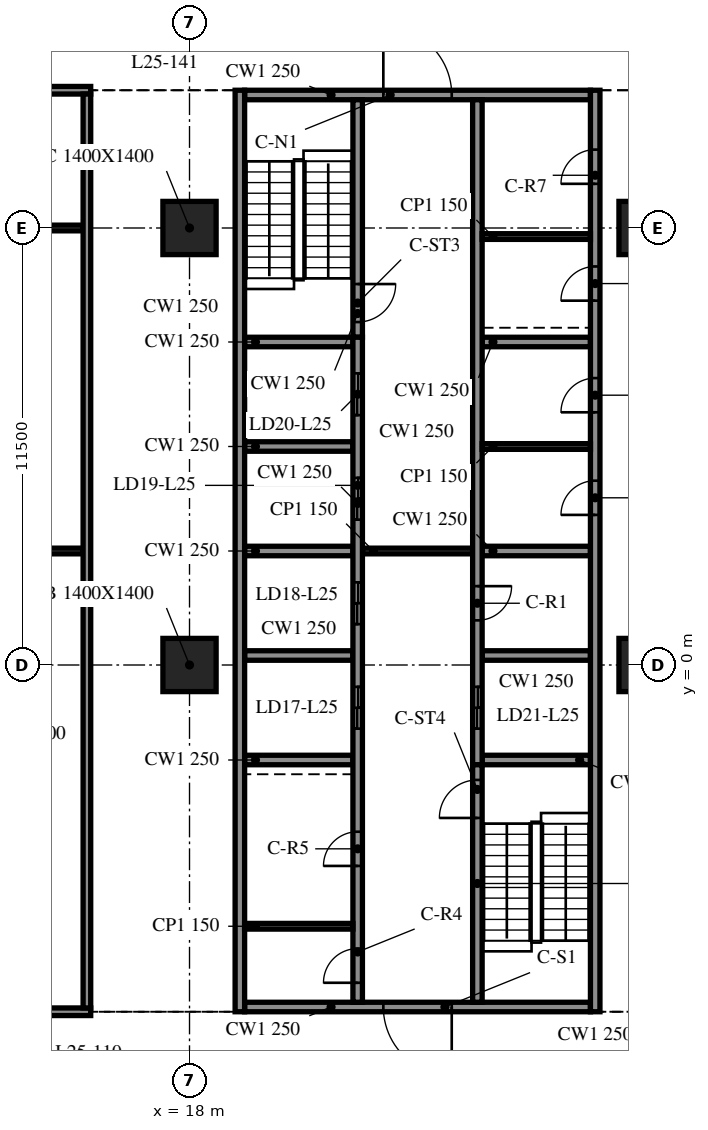
"""IFC4 building model, lengths in metres.
Left out: names, types, materials, properties, quantities, classifications, styles, units other than length and angle.
Written with IfcOpenShell. Run it as: python <this file> out.ifc"""

import sys

from ifc_helpers import new_model, si_unit, direction, frame, frame_2d, origin, origin_2d, place, context, subcontext, project, spatial, rectangle, extrude, element, fill, save


model = new_model("IFC4")
c1 = context("Model", 3, precision=1e-05, world=origin(), true_north=direction((0.0, 1.0)))
c2 = subcontext(c1, "Body", "Model", "MODEL_VIEW")
j1 = project(units=[si_unit("LENGTHUNIT", "METRE"), si_unit("PLANEANGLEUNIT", "RADIAN")], contexts=[c1])
p1 = place(None, origin())
s1 = spatial("IfcSite", under=j1, at=p1, CompositionType="ELEMENT")
p2 = place(p1, origin())
s2 = spatial("IfcBuilding", under=s1, at=p2, CompositionType="ELEMENT")
p3 = place(p2, frame((0.0, 0.0, 109.4)))
s3 = spatial("IfcBuildingStorey", under=s2, at=p3, CompositionType="ELEMENT", Elevation=109.4)
for number, where, z_axis, x_axis in (
    (1, (18.0, 0.0, -0.34), (0.0, 0.0, 1.0), (1.0, 0.0, 0.0)),
    (2, (18.0, 11.5, -0.34), (0.0, 0.0, 1.0), (1.0, 0.0, 0.0)),
    (3, (30.0, 0.0, -0.34), (0.0, 0.0, 1.0), (1.0, 0.0, 0.0)),
    (4, (30.0, 11.5, -0.34), (0.0, 0.0, 1.0), (1.0, 0.0, 0.0)),
):
    element("IfcColumn", number, at=place(p3, frame(where, z_axis=z_axis, x_axis=x_axis)), inside=s3, PredefinedType="COLUMN", context=c2, shape_type="SweptSolid", body=[
        extrude(rectangle(XDim=1.4, YDim=1.4, at=origin_2d()), origin(), (0.0, 0.0, 1.0), 4.1),
    ])
p4 = place(p3, frame((19.325, 15.125, 0.0), z_axis=(0.0, 0.0, 1.0), x_axis=(0.0, -1.0, 0.0)))
e5 = element("IfcWall", 5, at=p4, inside=s3, PredefinedType="SOLIDWALL", context=c2, shape_type="SweptSolid", body=[
    extrude(rectangle(XDim=24.25, YDim=0.25, at=frame_2d((12.125, 0.0))), origin(), (0.0, 0.0, 1.0), 3.76),
])
p5 = place(p3, frame((28.675, -9.125, 0.0), z_axis=(0.0, 0.0, 1.0), x_axis=(0.0, 1.0, 0.0)))
e6 = element("IfcWall", 6, at=p5, inside=s3, PredefinedType="SOLIDWALL", context=c2, shape_type="SweptSolid", body=[
    extrude(rectangle(XDim=24.25, YDim=0.25, at=frame_2d((12.125, 0.0))), origin(), (0.0, 0.0, 1.0), 3.76),
])
p6 = place(p5, frame((13.075, 0.0, 0.0)))
e7 = element("IfcOpeningElement", 7, at=p6, cuts=e6, PredefinedType="OPENING", context=c2, shape_type="SweptSolid", body=[
    extrude(rectangle(XDim=0.9, YDim=2.1, at=frame_2d((0.45, 1.05))), frame((0.0, 0.135, 0.0), z_axis=(0.0, -1.0, 0.0), x_axis=(1.0, 0.0, 0.0)), (0.0, 0.0, 1.0), 0.27),
])
p7 = place(p5, frame((15.775, 0.0, 0.0)))
e8 = element("IfcOpeningElement", 8, at=p7, cuts=e6, PredefinedType="OPENING", context=c2, shape_type="SweptSolid", body=[
    extrude(rectangle(XDim=0.9, YDim=2.1, at=frame_2d((0.45, 1.05))), frame((0.0, 0.135, 0.0), z_axis=(0.0, -1.0, 0.0), x_axis=(1.0, 0.0, 0.0)), (0.0, 0.0, 1.0), 0.27),
])
p8 = place(p5, frame((18.712, 0.0, 0.0)))
e9 = element("IfcOpeningElement", 9, at=p8, cuts=e6, PredefinedType="OPENING", context=c2, shape_type="SweptSolid", body=[
    extrude(rectangle(XDim=0.9, YDim=2.1, at=frame_2d((0.45, 1.05))), frame((0.0, 0.135, 0.0), z_axis=(0.0, -1.0, 0.0), x_axis=(1.0, 0.0, 0.0)), (0.0, 0.0, 1.0), 0.27),
])
p9 = place(p5, frame((21.788, 0.0, 0.0)))
e10 = element("IfcOpeningElement", 10, at=p9, cuts=e6, PredefinedType="OPENING", context=c2, shape_type="SweptSolid", body=[
    extrude(rectangle(XDim=0.9, YDim=2.1, at=frame_2d((0.45, 1.05))), frame((0.0, 0.135, 0.0), z_axis=(0.0, -1.0, 0.0), x_axis=(1.0, 0.0, 0.0)), (0.0, 0.0, 1.0), 0.27),
])
p10 = place(p3, frame((28.55, -9.0, 0.0), z_axis=(0.0, 0.0, 1.0), x_axis=(-1.0, 0.0, 0.0)))
e11 = element("IfcWall", 11, at=p10, inside=s3, PredefinedType="SOLIDWALL", context=c2, shape_type="SweptSolid", body=[
    extrude(rectangle(XDim=9.1, YDim=0.25, at=frame_2d((4.55, 0.0))), origin(), (0.0, 0.0, 1.0), 3.76),
])
p11 = place(p10, frame((3.65, 0.0, 0.0)))
e12 = element("IfcOpeningElement", 12, at=p11, cuts=e11, PredefinedType="OPENING", context=c2, shape_type="SweptSolid", body=[
    extrude(rectangle(XDim=1.8, YDim=2.1, at=frame_2d((0.9, 1.05))), frame((0.0, 0.135, 0.0), z_axis=(0.0, -1.0, 0.0), x_axis=(1.0, 0.0, 0.0)), (0.0, 0.0, 1.0), 0.27),
])
p12 = place(p3, frame((19.45, 15.0, 0.0), z_axis=(0.0, 0.0, 1.0), x_axis=(1.0, 0.0, 0.0)))
e13 = element("IfcWall", 13, at=p12, inside=s3, PredefinedType="SOLIDWALL", context=c2, shape_type="SweptSolid", body=[
    extrude(rectangle(XDim=9.1, YDim=0.25, at=frame_2d((4.55, 0.0))), origin(), (0.0, 0.0, 1.0), 3.76),
])
p13 = place(p12, frame((3.65, 0.0, 0.0)))
e14 = element("IfcOpeningElement", 14, at=p13, cuts=e13, PredefinedType="OPENING", context=c2, shape_type="SweptSolid", body=[
    extrude(rectangle(XDim=1.8, YDim=2.1, at=frame_2d((0.9, 1.05))), frame((0.0, 0.135, 0.0), z_axis=(0.0, -1.0, 0.0), x_axis=(1.0, 0.0, 0.0)), (0.0, 0.0, 1.0), 0.27),
])
p14 = place(p3, frame((22.425, -8.875, 0.0), z_axis=(0.0, 0.0, 1.0), x_axis=(0.0, 1.0, 0.0)))
e15 = element("IfcWall", 15, at=p14, inside=s3, PredefinedType="SOLIDWALL", context=c2, shape_type="SweptSolid", body=[
    extrude(rectangle(XDim=17.5, YDim=0.25, at=frame_2d((8.75, 0.0))), origin(), (0.0, 0.0, 1.0), 3.76),
])
p15 = place(p14, frame((7.2, 0.0, 0.0)))
e16 = element("IfcOpeningElement", 16, at=p15, cuts=e15, PredefinedType="OPENING", context=c2, shape_type="SweptSolid", body=[
    extrude(rectangle(XDim=1.1, YDim=2.1, at=frame_2d((0.55, 1.05))), frame((0.0, 0.135, 0.0), z_axis=(0.0, -1.0, 0.0), x_axis=(1.0, 0.0, 0.0)), (0.0, 0.0, 1.0), 0.27),
])
p16 = place(p14, frame((9.95, 0.0, 0.0)))
e17 = element("IfcOpeningElement", 17, at=p16, cuts=e15, PredefinedType="OPENING", context=c2, shape_type="SweptSolid", body=[
    extrude(rectangle(XDim=1.1, YDim=2.1, at=frame_2d((0.55, 1.05))), frame((0.0, 0.135, 0.0), z_axis=(0.0, -1.0, 0.0), x_axis=(1.0, 0.0, 0.0)), (0.0, 0.0, 1.0), 0.27),
])
p17 = place(p14, frame((12.7, 0.0, 0.0)))
e18 = element("IfcOpeningElement", 18, at=p17, cuts=e15, PredefinedType="OPENING", context=c2, shape_type="SweptSolid", body=[
    extrude(rectangle(XDim=1.1, YDim=2.1, at=frame_2d((0.55, 1.05))), frame((0.0, 0.135, 0.0), z_axis=(0.0, -1.0, 0.0), x_axis=(1.0, 0.0, 0.0)), (0.0, 0.0, 1.0), 0.27),
])
p18 = place(p14, frame((15.45, 0.0, 0.0)))
e19 = element("IfcOpeningElement", 19, at=p18, cuts=e15, PredefinedType="OPENING", context=c2, shape_type="SweptSolid", body=[
    extrude(rectangle(XDim=1.1, YDim=2.1, at=frame_2d((0.55, 1.05))), frame((0.0, 0.135, 0.0), z_axis=(0.0, -1.0, 0.0), x_axis=(1.0, 0.0, 0.0)), (0.0, 0.0, 1.0), 0.27),
])
p19 = place(p14, frame((0.512, 0.0, 0.0)))
e20 = element("IfcOpeningElement", 20, at=p19, cuts=e15, PredefinedType="OPENING", context=c2, shape_type="SweptSolid", body=[
    extrude(rectangle(XDim=0.9, YDim=2.1, at=frame_2d((0.45, 1.05))), frame((0.0, 0.135, 0.0), z_axis=(0.0, -1.0, 0.0), x_axis=(1.0, 0.0, 0.0)), (0.0, 0.0, 1.0), 0.27),
])
p20 = place(p14, frame((3.587, 0.0, 0.0)))
e21 = element("IfcOpeningElement", 21, at=p20, cuts=e15, PredefinedType="OPENING", context=c2, shape_type="SweptSolid", body=[
    extrude(rectangle(XDim=0.9, YDim=2.1, at=frame_2d((0.45, 1.05))), frame((0.0, 0.135, 0.0), z_axis=(0.0, -1.0, 0.0), x_axis=(1.0, 0.0, 0.0)), (0.0, 0.0, 1.0), 0.27),
])
p21 = place(p3, frame((22.425, 14.875, 0.0), z_axis=(0.0, 0.0, 1.0), x_axis=(0.0, -1.0, 0.0)))
e22 = element("IfcWall", 22, at=p21, inside=s3, PredefinedType="SOLIDWALL", context=c2, shape_type="SweptSolid", body=[
    extrude(rectangle(XDim=6.25, YDim=0.25, at=frame_2d((3.125, 0.0))), origin(), (0.0, 0.0, 1.0), 3.76),
])
p22 = place(p21, frame((4.85, 0.0, 0.0)))
e23 = element("IfcOpeningElement", 23, at=p22, cuts=e22, PredefinedType="OPENING", context=c2, shape_type="SweptSolid", body=[
    extrude(rectangle(XDim=1.0, YDim=2.1, at=frame_2d((0.5, 1.05))), frame((0.0, 0.135, 0.0), z_axis=(0.0, -1.0, 0.0), x_axis=(1.0, 0.0, 0.0)), (0.0, 0.0, 1.0), 0.27),
])
p23 = place(p3, frame((25.575, -8.875, 0.0), z_axis=(0.0, 0.0, 1.0), x_axis=(0.0, 1.0, 0.0)))
e24 = element("IfcWall", 24, at=p23, inside=s3, PredefinedType="SOLIDWALL", context=c2, shape_type="SweptSolid", body=[
    extrude(rectangle(XDim=6.25, YDim=0.25, at=frame_2d((3.125, 0.0))), origin(), (0.0, 0.0, 1.0), 3.76),
])
p24 = place(p23, frame((4.85, 0.0, 0.0)))
e25 = element("IfcOpeningElement", 25, at=p24, cuts=e24, PredefinedType="OPENING", context=c2, shape_type="SweptSolid", body=[
    extrude(rectangle(XDim=1.0, YDim=2.1, at=frame_2d((0.5, 1.05))), frame((0.0, 0.135, 0.0), z_axis=(0.0, -1.0, 0.0), x_axis=(1.0, 0.0, 0.0)), (0.0, 0.0, 1.0), 0.27),
])
p25 = place(p3, frame((25.575, 14.875, 0.0), z_axis=(0.0, 0.0, 1.0), x_axis=(0.0, -1.0, 0.0)))
e26 = element("IfcWall", 26, at=p25, inside=s3, PredefinedType="SOLIDWALL", context=c2, shape_type="SweptSolid", body=[
    extrude(rectangle(XDim=17.5, YDim=0.25, at=frame_2d((8.75, 0.0))), origin(), (0.0, 0.0, 1.0), 3.76),
])
p26 = place(p25, frame((15.45, 0.0, 0.0)))
e27 = element("IfcOpeningElement", 27, at=p26, cuts=e26, PredefinedType="OPENING", context=c2, shape_type="SweptSolid", body=[
    extrude(rectangle(XDim=1.1, YDim=2.1, at=frame_2d((0.55, 1.05))), frame((0.0, 0.135, 0.0), z_axis=(0.0, -1.0, 0.0), x_axis=(1.0, 0.0, 0.0)), (0.0, 0.0, 1.0), 0.27),
])
p27 = place(p25, frame((12.8, 0.0, 0.0)))
e28 = element("IfcOpeningElement", 28, at=p27, cuts=e26, PredefinedType="OPENING", context=c2, shape_type="SweptSolid", body=[
    extrude(rectangle(XDim=0.9, YDim=2.1, at=frame_2d((0.45, 1.05))), frame((0.0, 0.135, 0.0), z_axis=(0.0, -1.0, 0.0), x_axis=(1.0, 0.0, 0.0)), (0.0, 0.0, 1.0), 0.27),
])
for number, where, z_axis, x_axis in (
    (29, (19.45, -2.5, 0.0), (0.0, 0.0, 1.0), (1.0, 0.0, 0.0)),
    (30, (19.45, 0.25, 0.0), (0.0, 0.0, 1.0), (1.0, 0.0, 0.0)),
    (31, (19.45, 3.0, 0.0), (0.0, 0.0, 1.0), (1.0, 0.0, 0.0)),
    (32, (19.45, 5.75, 0.0), (0.0, 0.0, 1.0), (1.0, 0.0, 0.0)),
    (33, (19.45, 8.5, 0.0), (0.0, 0.0, 1.0), (1.0, 0.0, 0.0)),
    (34, (25.7, -2.5, 0.0), (0.0, 0.0, 1.0), (1.0, 0.0, 0.0)),
    (35, (25.7, 0.25, 0.0), (0.0, 0.0, 1.0), (1.0, 0.0, 0.0)),
    (36, (25.7, 3.0, 0.0), (0.0, 0.0, 1.0), (1.0, 0.0, 0.0)),
    (37, (25.7, 8.5, 0.0), (0.0, 0.0, 1.0), (1.0, 0.0, 0.0)),
):
    element("IfcWall", number, at=place(p3, frame(where, z_axis=z_axis, x_axis=x_axis)), inside=s3, PredefinedType="SOLIDWALL", context=c2, shape_type="SweptSolid", body=[
        extrude(rectangle(XDim=2.85, YDim=0.25, at=frame_2d((1.425, 0.0))), origin(), (0.0, 0.0, 1.0), 3.76),
    ])
p28 = place(p3, frame((22.55, 3.0, 0.0), z_axis=(0.0, 0.0, 1.0), x_axis=(1.0, 0.0, 0.0)))
e38 = element("IfcWall", 38, at=p28, inside=s3, PredefinedType="PARTITIONING", context=c2, shape_type="SweptSolid", body=[
    extrude(rectangle(XDim=2.9, YDim=0.15, at=frame_2d((1.45, 0.0))), origin(), (0.0, 0.0, 1.0), 3.76),
])
for number, where, z_axis, x_axis in (
    (39, (25.7, 5.75, 0.0), (0.0, 0.0, 1.0), (1.0, 0.0, 0.0)),
    (40, (19.45, -6.875, 0.0), (0.0, 0.0, 1.0), (1.0, 0.0, 0.0)),
    (41, (25.7, 11.275, 0.0), (0.0, 0.0, 1.0), (1.0, 0.0, 0.0)),
):
    element("IfcWall", number, at=place(p3, frame(where, z_axis=z_axis, x_axis=x_axis)), inside=s3, PredefinedType="PARTITIONING", context=c2, shape_type="SweptSolid", body=[
        extrude(rectangle(XDim=2.85, YDim=0.15, at=frame_2d((1.425, 0.0))), origin(), (0.0, 0.0, 1.0), 3.76),
    ])
p29 = place(p3, frame((8.5, -9.125, 0.0), z_axis=(0.0, 0.0, 1.0), x_axis=(1.0, 0.0, 0.0)))
e42 = element("IfcWall", 42, at=p29, inside=s3, PredefinedType="PARTITIONING", context=c2, shape_type="SweptSolid", body=[
    extrude(rectangle(XDim=6.9, YDim=0.2, at=frame_2d((3.45, 0.0))), origin(), (0.0, 0.0, 1.0), 3.76),
])
p30 = place(p29, frame((2.9, 0.0, 0.0)))
e43 = element("IfcOpeningElement", 43, at=p30, cuts=e42, PredefinedType="OPENING", context=c2, shape_type="SweptSolid", body=[
    extrude(rectangle(XDim=1.2, YDim=2.1, at=frame_2d((0.6, 1.05))), frame((0.0, 0.11, 0.0), z_axis=(0.0, -1.0, 0.0), x_axis=(1.0, 0.0, 0.0)), (0.0, 0.0, 1.0), 0.22),
])
for number, where, z_axis, x_axis in (
    (44, (8.7, 3.0, 0.0), (0.0, 0.0, 1.0), (1.0, 0.0, 0.0)),
    (45, (8.7, 11.5, 0.0), (0.0, 0.0, 1.0), (1.0, 0.0, 0.0)),
):
    element("IfcWall", number, at=place(p3, frame(where, z_axis=z_axis, x_axis=x_axis)), inside=s3, PredefinedType="PARTITIONING", context=c2, shape_type="SweptSolid", body=[
        extrude(rectangle(XDim=6.5, YDim=0.15, at=frame_2d((3.25, 0.0))), origin(), (0.0, 0.0, 1.0), 3.76),
    ])
p31 = place(p3, frame((8.5, 15.125, 0.0), z_axis=(0.0, 0.0, 1.0), x_axis=(1.0, 0.0, 0.0)))
e46 = element("IfcWall", 46, at=p31, inside=s3, PredefinedType="PARTITIONING", context=c2, shape_type="SweptSolid", body=[
    extrude(rectangle(XDim=6.9, YDim=0.2, at=frame_2d((3.45, 0.0))), origin(), (0.0, 0.0, 1.0), 3.76),
])
p32 = place(p31, frame((2.9, 0.0, 0.0)))
e47 = element("IfcOpeningElement", 47, at=p32, cuts=e46, PredefinedType="OPENING", context=c2, shape_type="SweptSolid", body=[
    extrude(rectangle(XDim=1.0, YDim=2.1, at=frame_2d((0.5, 1.05))), frame((0.0, 0.11, 0.0), z_axis=(0.0, -1.0, 0.0), x_axis=(1.0, 0.0, 0.0)), (0.0, 0.0, 1.0), 0.22),
])
p33 = place(p3, frame((15.3, -9.025, 0.0), z_axis=(0.0, 0.0, 1.0), x_axis=(0.0, 1.0, 0.0)))
e48 = element("IfcWall", 48, at=p33, inside=s3, PredefinedType="PARTITIONING", context=c2, shape_type="SweptSolid", body=[
    extrude(rectangle(XDim=24.05, YDim=0.2, at=frame_2d((12.025, 0.0))), origin(), (0.0, 0.0, 1.0), 3.76),
])
p34 = place(p11, origin())
e49 = element("IfcDoor", 49, at=p34, inside=s3, OperationType="DOUBLE_DOOR_SINGLE_SWING", PredefinedType="DOOR", context=c2, shape_type="SweptSolid", body=[
    extrude(rectangle(XDim=1.8, YDim=2.1, at=frame_2d((0.9, 1.05))), frame((0.0, 0.025, 0.0), z_axis=(0.0, -1.0, 0.0), x_axis=(1.0, 0.0, 0.0)), (0.0, 0.0, 1.0), 0.05),
])
fill(e12, e49)
p35 = place(p13, origin())
e50 = element("IfcDoor", 50, at=p35, inside=s3, OperationType="DOUBLE_DOOR_SINGLE_SWING", PredefinedType="DOOR", context=c2, shape_type="SweptSolid", body=[
    extrude(rectangle(XDim=1.8, YDim=2.1, at=frame_2d((0.9, 1.05))), frame((0.0, 0.025, 0.0), z_axis=(0.0, -1.0, 0.0), x_axis=(1.0, 0.0, 0.0)), (0.0, 0.0, 1.0), 0.05),
])
fill(e14, e50)
p36 = place(p26, origin())
e51 = element("IfcDoor", 51, at=p36, inside=s3, OperationType="DOUBLE_DOOR_SLIDING", PredefinedType="DOOR", context=c2, shape_type="SweptSolid", body=[
    extrude(rectangle(XDim=1.1, YDim=2.1, at=frame_2d((0.55, 1.05))), frame((0.0, 0.025, 0.0), z_axis=(0.0, -1.0, 0.0), x_axis=(1.0, 0.0, 0.0)), (0.0, 0.0, 1.0), 0.05),
])
fill(e27, e51)
p37 = place(p15, origin())
e52 = element("IfcDoor", 52, at=p37, inside=s3, OperationType="DOUBLE_DOOR_SLIDING", PredefinedType="DOOR", context=c2, shape_type="SweptSolid", body=[
    extrude(rectangle(XDim=1.1, YDim=2.1, at=frame_2d((0.55, 1.05))), frame((0.0, 0.025, 0.0), z_axis=(0.0, -1.0, 0.0), x_axis=(1.0, 0.0, 0.0)), (0.0, 0.0, 1.0), 0.05),
])
fill(e16, e52)
p38 = place(p16, origin())
e53 = element("IfcDoor", 53, at=p38, inside=s3, OperationType="DOUBLE_DOOR_SLIDING", PredefinedType="DOOR", context=c2, shape_type="SweptSolid", body=[
    extrude(rectangle(XDim=1.1, YDim=2.1, at=frame_2d((0.55, 1.05))), frame((0.0, 0.025, 0.0), z_axis=(0.0, -1.0, 0.0), x_axis=(1.0, 0.0, 0.0)), (0.0, 0.0, 1.0), 0.05),
])
fill(e17, e53)
p39 = place(p17, origin())
e54 = element("IfcDoor", 54, at=p39, inside=s3, OperationType="DOUBLE_DOOR_SLIDING", PredefinedType="DOOR", context=c2, shape_type="SweptSolid", body=[
    extrude(rectangle(XDim=1.1, YDim=2.1, at=frame_2d((0.55, 1.05))), frame((0.0, 0.025, 0.0), z_axis=(0.0, -1.0, 0.0), x_axis=(1.0, 0.0, 0.0)), (0.0, 0.0, 1.0), 0.05),
])
fill(e18, e54)
p40 = place(p18, origin())
e55 = element("IfcDoor", 55, at=p40, inside=s3, OperationType="DOUBLE_DOOR_SLIDING", PredefinedType="DOOR", context=c2, shape_type="SweptSolid", body=[
    extrude(rectangle(XDim=1.1, YDim=2.1, at=frame_2d((0.55, 1.05))), frame((0.0, 0.025, 0.0), z_axis=(0.0, -1.0, 0.0), x_axis=(1.0, 0.0, 0.0)), (0.0, 0.0, 1.0), 0.05),
])
fill(e19, e55)
p41 = place(p27, origin())
e56 = element("IfcDoor", 56, at=p41, inside=s3, OperationType="SINGLE_SWING_LEFT", PredefinedType="DOOR", context=c2, shape_type="SweptSolid", body=[
    extrude(rectangle(XDim=0.9, YDim=2.1, at=frame_2d((0.45, 1.05))), frame((0.0, 0.025, 0.0), z_axis=(0.0, -1.0, 0.0), x_axis=(1.0, 0.0, 0.0)), (0.0, 0.0, 1.0), 0.05),
])
fill(e28, e56)
p42 = place(p6, origin())
e57 = element("IfcDoor", 57, at=p42, inside=s3, OperationType="SINGLE_SWING_RIGHT", PredefinedType="DOOR", context=c2, shape_type="SweptSolid", body=[
    extrude(rectangle(XDim=0.9, YDim=2.1, at=frame_2d((0.45, 1.05))), frame((0.0, 0.025, 0.0), z_axis=(0.0, -1.0, 0.0), x_axis=(1.0, 0.0, 0.0)), (0.0, 0.0, 1.0), 0.05),
])
fill(e7, e57)
p43 = place(p7, origin())
e58 = element("IfcDoor", 58, at=p43, inside=s3, OperationType="SINGLE_SWING_LEFT", PredefinedType="DOOR", context=c2, shape_type="SweptSolid", body=[
    extrude(rectangle(XDim=0.9, YDim=2.1, at=frame_2d((0.45, 1.05))), frame((0.0, 0.025, 0.0), z_axis=(0.0, -1.0, 0.0), x_axis=(1.0, 0.0, 0.0)), (0.0, 0.0, 1.0), 0.05),
])
fill(e8, e58)
p44 = place(p19, origin())
e59 = element("IfcDoor", 59, at=p44, inside=s3, OperationType="SINGLE_SWING_RIGHT", PredefinedType="DOOR", context=c2, shape_type="SweptSolid", body=[
    extrude(rectangle(XDim=0.9, YDim=2.1, at=frame_2d((0.45, 1.05))), frame((0.0, 0.025, 0.0), z_axis=(0.0, -1.0, 0.0), x_axis=(1.0, 0.0, 0.0)), (0.0, 0.0, 1.0), 0.05),
])
fill(e20, e59)
p45 = place(p20, origin())
e60 = element("IfcDoor", 60, at=p45, inside=s3, OperationType="SINGLE_SWING_LEFT", PredefinedType="DOOR", context=c2, shape_type="SweptSolid", body=[
    extrude(rectangle(XDim=0.9, YDim=2.1, at=frame_2d((0.45, 1.05))), frame((0.0, 0.025, 0.0), z_axis=(0.0, -1.0, 0.0), x_axis=(1.0, 0.0, 0.0)), (0.0, 0.0, 1.0), 0.05),
])
fill(e21, e60)
p46 = place(p8, origin())
e61 = element("IfcDoor", 61, at=p46, inside=s3, OperationType="SINGLE_SWING_RIGHT", PredefinedType="DOOR", context=c2, shape_type="SweptSolid", body=[
    extrude(rectangle(XDim=0.9, YDim=2.1, at=frame_2d((0.45, 1.05))), frame((0.0, 0.025, 0.0), z_axis=(0.0, -1.0, 0.0), x_axis=(1.0, 0.0, 0.0)), (0.0, 0.0, 1.0), 0.05),
])
fill(e9, e61)
p47 = place(p9, origin())
e62 = element("IfcDoor", 62, at=p47, inside=s3, OperationType="SINGLE_SWING_LEFT", PredefinedType="DOOR", context=c2, shape_type="SweptSolid", body=[
    extrude(rectangle(XDim=0.9, YDim=2.1, at=frame_2d((0.45, 1.05))), frame((0.0, 0.025, 0.0), z_axis=(0.0, -1.0, 0.0), x_axis=(1.0, 0.0, 0.0)), (0.0, 0.0, 1.0), 0.05),
])
fill(e10, e62)
p48 = place(p22, origin())
e63 = element("IfcDoor", 63, at=p48, inside=s3, OperationType="SINGLE_SWING_RIGHT", PredefinedType="DOOR", context=c2, shape_type="SweptSolid", body=[
    extrude(rectangle(XDim=1.0, YDim=2.1, at=frame_2d((0.5, 1.05))), frame((0.0, 0.025, 0.0), z_axis=(0.0, -1.0, 0.0), x_axis=(1.0, 0.0, 0.0)), (0.0, 0.0, 1.0), 0.05),
])
fill(e23, e63)
p49 = place(p24, origin())
e64 = element("IfcDoor", 64, at=p49, inside=s3, OperationType="SINGLE_SWING_LEFT", PredefinedType="DOOR", context=c2, shape_type="SweptSolid", body=[
    extrude(rectangle(XDim=1.0, YDim=2.1, at=frame_2d((0.5, 1.05))), frame((0.0, 0.025, 0.0), z_axis=(0.0, -1.0, 0.0), x_axis=(1.0, 0.0, 0.0)), (0.0, 0.0, 1.0), 0.05),
])
fill(e25, e64)
save(model, sys.argv[1])
